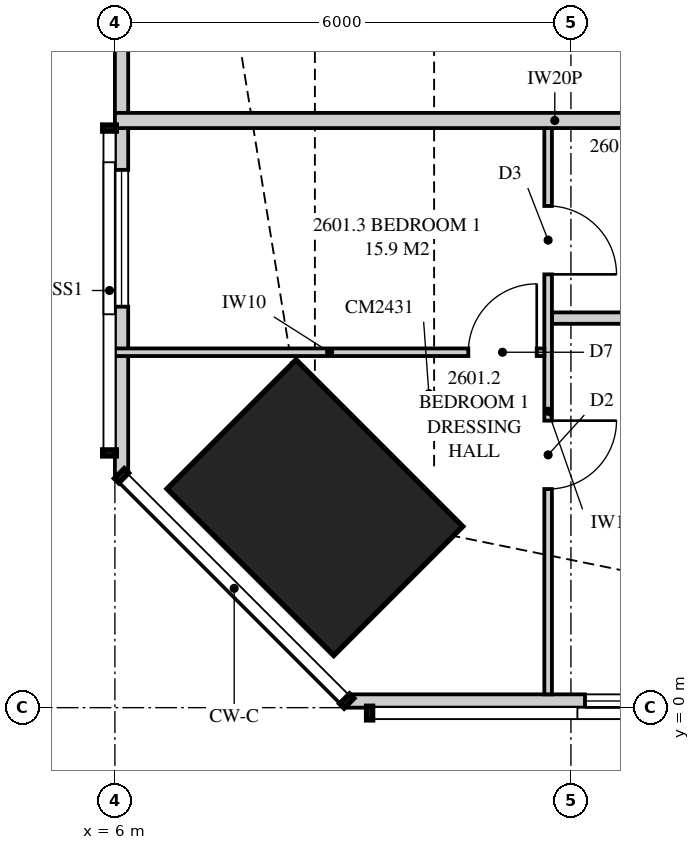
"""IFC4 building model, lengths in metres.
Left out: names, types, materials, properties, quantities, classifications, styles, units other than length and angle.
Written with IfcOpenShell. Run it as: python <this file> out.ifc"""

import sys

from ifc_helpers import new_model, si_unit, direction, frame, frame_2d, origin, origin_2d, place, context, subcontext, project, spatial, polyline, rectangle, outline, extrude, element, fill, save


model = new_model("IFC4")
c1 = context("Model", 3, precision=1e-05, world=origin(), true_north=direction((0.0, 1.0)))
c2 = subcontext(c1, "Body", "Model", "MODEL_VIEW")
j1 = project(units=[si_unit("LENGTHUNIT", "METRE"), si_unit("PLANEANGLEUNIT", "RADIAN")], contexts=[c1])
p1 = place(None, origin())
s1 = spatial("IfcSite", under=j1, at=p1, CompositionType="ELEMENT")
p2 = place(p1, origin())
s2 = spatial("IfcBuilding", under=s1, at=p2, CompositionType="ELEMENT")
p3 = place(p2, frame((0.0, 0.0, 98.15)))
s3 = spatial("IfcBuildingStorey", under=s2, at=p3, CompositionType="ELEMENT", Elevation=98.15)
p4 = place(p3, frame((8.631, 2.631, 0.0), z_axis=(0.0, 0.0, 1.0), x_axis=(0.707106781187, 0.707106781187, 0.0)))
e1 = element("IfcColumn", 1, at=p4, inside=s3, PredefinedType="COLUMN", context=c2, shape_type="SweptSolid", body=[
    extrude(rectangle(XDim=2.4, YDim=3.1, at=origin_2d()), origin(), (0.0, 0.0, 1.0), 3.35),
])
p5 = place(p3, frame((9.051, 0.087, 0.0), z_axis=(0.0, 0.0, 1.0), x_axis=(1.0, 0.0, 0.0)))
e2 = element("IfcWall", 2, at=p5, inside=s3, PredefinedType="SOLIDWALL", context=c2, shape_type="SweptSolid", body=[
    extrude(outline(polyline([(0.0, 0.0), (12.999, 0.0), (12.999, 2.15), (7.824, 2.15), (7.824, 3.11), (7.666, 3.11), (7.666, 2.15), (7.62, 2.15), (7.62, 3.11), (0.0, 3.11), (0.0, 0.0)])), frame((0.0, 0.087, 0.0), z_axis=(0.0, -1.0, 0.0), x_axis=(1.0, 0.0, 0.0)), (0.0, 0.0, 1.0), 0.175),
])
p6 = place(p5, frame((3.134, 0.0, 0.4)))
e3 = element("IfcOpeningElement", 3, at=p6, cuts=e2, PredefinedType="OPENING", context=c2, shape_type="SweptSolid", body=[
    extrude(rectangle(XDim=1.8, YDim=1.7, at=frame_2d((0.9, 0.85))), frame((0.0, 0.097, 0.0), z_axis=(0.0, -1.0, 0.0), x_axis=(1.0, 0.0, 0.0)), (0.0, 0.0, 1.0), 0.195),
])
p7 = place(p5, frame((10.706, 0.0, 0.4)))
e4 = element("IfcOpeningElement", 4, at=p7, cuts=e2, PredefinedType="OPENING", context=c2, shape_type="SweptSolid", body=[
    extrude(rectangle(XDim=1.8, YDim=1.7, at=frame_2d((0.9, 0.85))), frame((0.0, 0.097, 0.0), z_axis=(0.0, -1.0, 0.0), x_axis=(1.0, 0.0, 0.0)), (0.0, 0.0, 1.0), 0.195),
])
p8 = place(p3, frame((6.087, 19.137, 0.0), z_axis=(0.0, 0.0, 1.0), x_axis=(0.0, -1.0, 0.0)))
e5 = element("IfcWall", 5, at=p8, inside=s3, PredefinedType="SOLIDWALL", context=c2, shape_type="SweptSolid", body=[
    extrude(outline(polyline([(0.0, 0.0), (16.086, 0.0), (16.086, 3.11), (6.356, 3.11), (6.356, 2.15), (6.263, 2.15), (6.263, 3.11), (6.137, 3.11), (6.137, 2.15), (0.0, 2.15), (0.0, 0.0)])), frame((0.0, 0.087, 0.0), z_axis=(0.0, -1.0, 0.0), x_axis=(1.0, 0.0, 0.0)), (0.0, 0.0, 1.0), 0.175),
])
p9 = place(p8, frame((1.481, 0.0, 0.4)))
e6 = element("IfcOpeningElement", 6, at=p9, cuts=e5, PredefinedType="OPENING", context=c2, shape_type="SweptSolid", body=[
    extrude(rectangle(XDim=1.8, YDim=1.7, at=frame_2d((0.9, 0.85))), frame((0.0, 0.097, 0.0), z_axis=(0.0, -1.0, 0.0), x_axis=(1.0, 0.0, 0.0)), (0.0, 0.0, 1.0), 0.195),
])
p10 = place(p8, frame((9.076, 0.0, 0.4)))
e7 = element("IfcOpeningElement", 7, at=p10, cuts=e5, PredefinedType="OPENING", context=c2, shape_type="SweptSolid", body=[
    extrude(rectangle(XDim=1.2, YDim=1.7, at=frame_2d((0.6, 0.85))), frame((0.0, 0.097, 0.0), z_axis=(0.0, -1.0, 0.0), x_axis=(1.0, 0.0, 0.0)), (0.0, 0.0, 1.0), 0.195),
])
p11 = place(p8, frame((12.062, 0.0, 0.4)))
e8 = element("IfcOpeningElement", 8, at=p11, cuts=e5, PredefinedType="OPENING", context=c2, shape_type="SweptSolid", body=[
    extrude(rectangle(XDim=1.8, YDim=1.7, at=frame_2d((0.9, 0.85))), frame((0.0, 0.097, 0.0), z_axis=(0.0, -1.0, 0.0), x_axis=(1.0, 0.0, 0.0)), (0.0, 0.0, 1.0), 0.195),
])
p12 = place(p3, frame((11.7, 0.175, 0.0), z_axis=(0.0, 0.0, 1.0), x_axis=(0.0, 1.0, 0.0)))
e9 = element("IfcWall", 9, at=p12, inside=s3, PredefinedType="PARTITIONING", context=c2, shape_type="SweptSolid", body=[
    extrude(outline(polyline([(0.0, 0.0), (7.45, 0.0), (7.45, 3.11), (2.708, 3.11), (2.708, 2.15), (0.953, 2.15), (0.953, 3.11), (0.0, 3.11), (0.0, 0.0)])), frame((0.0, 0.05, 0.0), z_axis=(0.0, -1.0, 0.0), x_axis=(1.0, 0.0, 0.0)), (0.0, 0.0, 1.0), 0.1),
])
p13 = place(p12, frame((2.701, 0.0, 0.0)))
e10 = element("IfcOpeningElement", 10, at=p13, cuts=e9, PredefinedType="OPENING", context=c2, shape_type="SweptSolid", body=[
    extrude(rectangle(XDim=0.9, YDim=2.1, at=frame_2d((0.45, 1.05))), frame((0.0, 0.06, 0.0), z_axis=(0.0, -1.0, 0.0), x_axis=(1.0, 0.0, 0.0)), (0.0, 0.0, 1.0), 0.12),
])
p14 = place(p12, frame((5.525, 0.0, 0.0)))
e11 = element("IfcOpeningElement", 11, at=p14, cuts=e9, PredefinedType="OPENING", context=c2, shape_type="SweptSolid", body=[
    extrude(rectangle(XDim=0.9, YDim=2.1, at=frame_2d((0.45, 1.05))), frame((0.0, 0.06, 0.0), z_axis=(0.0, -1.0, 0.0), x_axis=(1.0, 0.0, 0.0)), (0.0, 0.0, 1.0), 0.12),
])
p15 = place(p3, frame((6.0, 4.676, 0.0), z_axis=(0.0, 0.0, 1.0), x_axis=(1.0, 0.0, 0.0)))
e12 = element("IfcWall", 12, at=p15, inside=s3, PredefinedType="PARTITIONING", context=c2, shape_type="SweptSolid", body=[
    extrude(outline(polyline([(0.0, 0.0), (5.65, 0.0), (5.65, 3.11), (5.46, 3.11), (5.46, 2.51), (3.171, 2.51), (3.171, 2.15), (1.429, 2.15), (1.429, 3.11), (0.0, 3.11), (0.0, 0.0)])), frame((0.0, 0.05, 0.0), z_axis=(0.0, -1.0, 0.0), x_axis=(1.0, 0.0, 0.0)), (0.0, 0.0, 1.0), 0.1),
])
p16 = place(p15, frame((4.65, 0.0, 0.0)))
e13 = element("IfcOpeningElement", 13, at=p16, cuts=e12, PredefinedType="OPENING", context=c2, shape_type="SweptSolid", body=[
    extrude(rectangle(XDim=0.9, YDim=2.1, at=frame_2d((0.45, 1.05))), frame((0.0, 0.06, 0.0), z_axis=(0.0, -1.0, 0.0), x_axis=(1.0, 0.0, 0.0)), (0.0, 0.0, 1.0), 0.12),
])
p17 = place(p3, frame((11.75, 5.125, 0.0), z_axis=(0.0, 0.0, 1.0), x_axis=(1.0, 0.0, 0.0)))
e14 = element("IfcWall", 14, at=p17, inside=s3, PredefinedType="PLUMBINGWALL", context=c2, shape_type="SweptSolid", body=[
    extrude(outline(polyline([(0.0, 0.0), (5.9, 0.0), (5.9, 3.11), (5.438, 3.11), (5.438, 2.541), (4.812, 2.541), (4.812, 3.11), (0.0, 3.11), (0.0, 0.0)])), frame((0.0, 0.075, 0.0), z_axis=(0.0, -1.0, 0.0), x_axis=(1.0, 0.0, 0.0)), (0.0, 0.0, 1.0), 0.15),
])
p18 = place(p17, frame((4.6, 0.0, 0.0)))
e15 = element("IfcOpeningElement", 15, at=p18, cuts=e14, PredefinedType="OPENING", context=c2, shape_type="SweptSolid", body=[
    extrude(rectangle(XDim=0.9, YDim=2.1, at=frame_2d((0.45, 1.05))), frame((0.0, 0.085, 0.0), z_axis=(0.0, -1.0, 0.0), x_axis=(1.0, 0.0, 0.0)), (0.0, 0.0, 1.0), 0.17),
])
p19 = place(p3, frame((6.0, 7.725, 0.0), z_axis=(0.0, 0.0, 1.0), x_axis=(1.0, 0.0, 0.0)))
e16 = element("IfcWall", 16, at=p19, inside=s3, PredefinedType="PARTITIONING", context=c2, shape_type="SweptSolid", body=[
    extrude(outline(polyline([(0.0, 0.0), (11.575, 0.0), (11.575, 3.11), (11.212, 3.11), (11.212, 2.541), (10.538, 2.541), (10.538, 3.11), (5.51, 3.11), (5.51, 2.51), (2.969, 2.51), (2.969, 2.541), (2.727, 2.541), (2.727, 2.15), (0.884, 2.15), (0.884, 3.11), (0.0, 3.11), (0.0, 0.0)])), frame((0.0, 0.1, 0.0), z_axis=(0.0, -1.0, 0.0), x_axis=(1.0, 0.0, 0.0)), (0.0, 0.0, 1.0), 0.2),
])
p20 = place(p6, origin())
e17 = element("IfcWindow", 17, at=p20, inside=s3, PartitioningType="SINGLE_PANEL", PredefinedType="WINDOW", context=c2, shape_type="SweptSolid", body=[
    extrude(rectangle(XDim=1.8, YDim=1.7, at=frame_2d((0.9, 0.85))), frame((0.0, 0.03, 0.0), z_axis=(0.0, -1.0, 0.0), x_axis=(1.0, 0.0, 0.0)), (0.0, 0.0, 1.0), 0.06),
])
fill(e3, e17)
p21 = place(p11, origin())
e18 = element("IfcWindow", 18, at=p21, inside=s3, PartitioningType="SINGLE_PANEL", PredefinedType="WINDOW", context=c2, shape_type="SweptSolid", body=[
    extrude(rectangle(XDim=1.8, YDim=1.7, at=frame_2d((0.9, 0.85))), frame((0.0, 0.03, 0.0), z_axis=(0.0, -1.0, 0.0), x_axis=(1.0, 0.0, 0.0)), (0.0, 0.0, 1.0), 0.06),
])
fill(e8, e18)
p22 = place(p16, origin())
e19 = element("IfcDoor", 19, at=p22, inside=s3, OperationType="SINGLE_SWING_RIGHT", PredefinedType="DOOR", context=c2, shape_type="SweptSolid", body=[
    extrude(rectangle(XDim=0.9, YDim=2.1, at=frame_2d((0.45, 1.05))), frame((0.0, 0.025, 0.0), z_axis=(0.0, -1.0, 0.0), x_axis=(1.0, 0.0, 0.0)), (0.0, 0.0, 1.0), 0.05),
])
fill(e13, e19)
p23 = place(p13, frame((0.9, 0.0, 0.0), z_axis=(0.0, 0.0, 1.0), x_axis=(-1.0, 0.0, 0.0)))
e20 = element("IfcDoor", 20, at=p23, inside=s3, OperationType="SINGLE_SWING_LEFT", PredefinedType="DOOR", context=c2, shape_type="SweptSolid", body=[
    extrude(rectangle(XDim=0.9, YDim=2.1, at=frame_2d((0.45, 1.05))), frame((0.0, 0.025, 0.0), z_axis=(0.0, -1.0, 0.0), x_axis=(1.0, 0.0, 0.0)), (0.0, 0.0, 1.0), 0.05),
])
fill(e10, e20)
p24 = place(p14, frame((0.9, 0.0, 0.0), z_axis=(0.0, 0.0, 1.0), x_axis=(-1.0, 0.0, 0.0)))
e21 = element("IfcDoor", 21, at=p24, inside=s3, OperationType="SINGLE_SWING_RIGHT", PredefinedType="DOOR", context=c2, shape_type="SweptSolid", body=[
    extrude(rectangle(XDim=0.9, YDim=2.1, at=frame_2d((0.45, 1.05))), frame((0.0, 0.025, 0.0), z_axis=(0.0, -1.0, 0.0), x_axis=(1.0, 0.0, 0.0)), (0.0, 0.0, 1.0), 0.05),
])
fill(e11, e21)
save(model, sys.argv[1])
